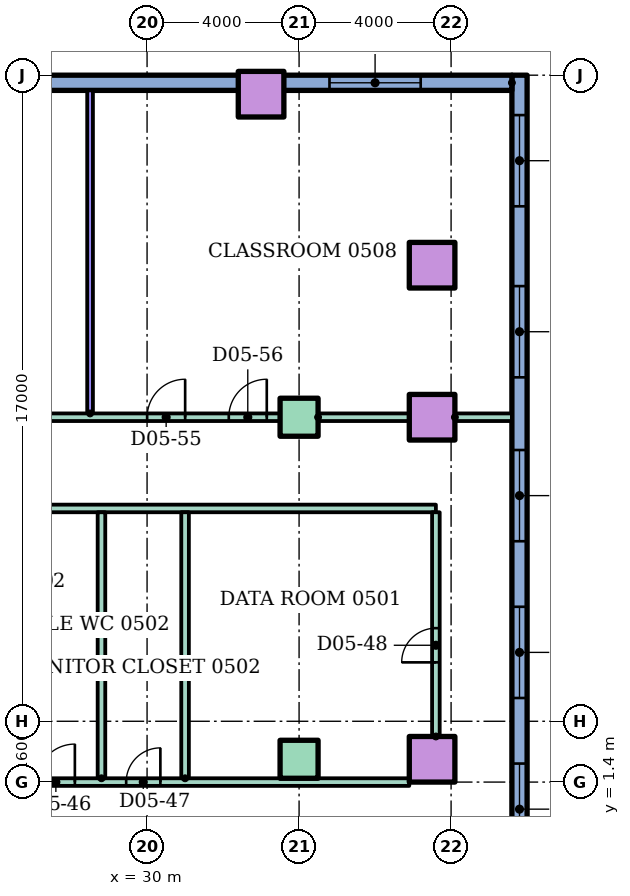
"""IFC4 building model, lengths in metres.
Left out: names, types, materials, properties, quantities, classifications, styles, units other than length and angle.
Written with IfcOpenShell. Run it as: python <this file> out.ifc"""

import sys

from ifc_helpers import new_model, si_unit, direction, frame, frame_2d, origin, origin_2d, place, context, subcontext, project, spatial, rectangle, hollow_rectangle, extrude, element, fill, save


model = new_model("IFC4")
c1 = context("Model", 3, precision=1e-05, world=origin(), true_north=direction((0.0, 1.0)))
c2 = subcontext(c1, "Body", "Model", "MODEL_VIEW")
j1 = project(units=[si_unit("LENGTHUNIT", "METRE"), si_unit("PLANEANGLEUNIT", "RADIAN")], contexts=[c1])
p1 = place(None, origin())
s1 = spatial("IfcSite", under=j1, at=p1, CompositionType="ELEMENT")
p2 = place(p1, origin())
s2 = spatial("IfcBuilding", under=s1, at=p2, CompositionType="ELEMENT")
p3 = place(p2, frame((0.0, 0.0, 22.0)))
s3 = spatial("IfcBuildingStorey", under=s2, at=p3, CompositionType="ELEMENT", Elevation=22.0)
p4 = place(p3, frame((34.0, 2.0, 0.0)))
e1 = element("IfcColumn", 1, at=p4, inside=s3, PredefinedType="COLUMN", context=c2, shape_type="SweptSolid", body=[
    extrude(rectangle(XDim=1.0, YDim=1.0, at=origin_2d()), origin(), (0.0, 0.0, 1.0), 4.0),
])
p5 = place(p3, frame((37.5, 2.0, 0.0)))
e2 = element("IfcColumn", 2, at=p5, inside=s3, PredefinedType="COLUMN", context=c2, shape_type="SweptSolid", body=[
    extrude(hollow_rectangle(XDim=1.2, YDim=1.2, WallThickness=0.06, at=origin_2d()), origin(), (0.0, 0.0, 1.0), 4.0),
])
p6 = place(p3, frame((34.0, 11.0, 0.0)))
e3 = element("IfcColumn", 3, at=p6, inside=s3, PredefinedType="COLUMN", context=c2, shape_type="SweptSolid", body=[
    extrude(rectangle(XDim=1.0, YDim=1.0, at=origin_2d()), origin(), (0.0, 0.0, 1.0), 4.0),
])
for number, where in (
    (4, (37.5, 11.0, 0.0)),
    (5, (37.5, 15.0, 0.0)),
    (6, (33.0, 19.5, 0.0)),
):
    element("IfcColumn", number, at=place(p3, frame(where)), inside=s3, PredefinedType="COLUMN", context=c2, shape_type="SweptSolid", body=[
        extrude(hollow_rectangle(XDim=1.2, YDim=1.2, WallThickness=0.06, at=origin_2d()), origin(), (0.0, 0.0, 1.0), 4.0),
    ])
p7 = place(p3, frame((39.8, -50.0, 0.0), z_axis=(0.0, 0.0, 1.0), x_axis=(0.0, 1.0, 0.0)))
e7 = element("IfcWall", 7, at=p7, inside=s3, PredefinedType="STANDARD", context=c2, shape_type="SweptSolid", body=[
    extrude(rectangle(XDim=70.0, YDim=0.4, at=frame_2d((35.0, 0.0))), origin(), (0.0, 0.0, 1.0), 3.7),
])
p8 = place(p7, frame((0.75, 0.0, 0.9)))
e8 = element("IfcOpeningElement", 8, at=p8, cuts=e7, PredefinedType="OPENING", context=c2, shape_type="SweptSolid", body=[
    extrude(rectangle(XDim=2.4, YDim=2.1, at=frame_2d((1.2, 1.05))), frame((0.0, 0.21, 0.0), z_axis=(0.0, -1.0, 0.0), x_axis=(1.0, 0.0, 0.0)), (0.0, 0.0, 1.0), 0.42),
])
p9 = place(p7, frame((6.633, 0.0, 0.9)))
e9 = element("IfcOpeningElement", 9, at=p9, cuts=e7, PredefinedType="OPENING", context=c2, shape_type="SweptSolid", body=[
    extrude(rectangle(XDim=2.4, YDim=2.1, at=frame_2d((1.2, 1.05))), frame((0.0, 0.21, 0.0), z_axis=(0.0, -1.0, 0.0), x_axis=(1.0, 0.0, 0.0)), (0.0, 0.0, 1.0), 0.42),
])
p10 = place(p7, frame((10.3, 0.0, 0.9)))
e10 = element("IfcOpeningElement", 10, at=p10, cuts=e7, PredefinedType="OPENING", context=c2, shape_type="SweptSolid", body=[
    extrude(rectangle(XDim=2.4, YDim=2.1, at=frame_2d((1.2, 1.05))), frame((0.0, 0.21, 0.0), z_axis=(0.0, -1.0, 0.0), x_axis=(1.0, 0.0, 0.0)), (0.0, 0.0, 1.0), 0.42),
])
p11 = place(p7, frame((13.967, 0.0, 0.9)))
e11 = element("IfcOpeningElement", 11, at=p11, cuts=e7, PredefinedType="OPENING", context=c2, shape_type="SweptSolid", body=[
    extrude(rectangle(XDim=2.4, YDim=2.1, at=frame_2d((1.2, 1.05))), frame((0.0, 0.21, 0.0), z_axis=(0.0, -1.0, 0.0), x_axis=(1.0, 0.0, 0.0)), (0.0, 0.0, 1.0), 0.42),
])
p12 = place(p7, frame((17.633, 0.0, 0.9)))
e12 = element("IfcOpeningElement", 12, at=p12, cuts=e7, PredefinedType="OPENING", context=c2, shape_type="SweptSolid", body=[
    extrude(rectangle(XDim=2.4, YDim=2.1, at=frame_2d((1.2, 1.05))), frame((0.0, 0.21, 0.0), z_axis=(0.0, -1.0, 0.0), x_axis=(1.0, 0.0, 0.0)), (0.0, 0.0, 1.0), 0.42),
])
p13 = place(p7, frame((21.3, 0.0, 0.9)))
e13 = element("IfcOpeningElement", 13, at=p13, cuts=e7, PredefinedType="OPENING", context=c2, shape_type="SweptSolid", body=[
    extrude(rectangle(XDim=2.4, YDim=2.1, at=frame_2d((1.2, 1.05))), frame((0.0, 0.21, 0.0), z_axis=(0.0, -1.0, 0.0), x_axis=(1.0, 0.0, 0.0)), (0.0, 0.0, 1.0), 0.42),
])
p14 = place(p7, frame((24.967, 0.0, 0.9)))
e14 = element("IfcOpeningElement", 14, at=p14, cuts=e7, PredefinedType="OPENING", context=c2, shape_type="SweptSolid", body=[
    extrude(rectangle(XDim=2.4, YDim=2.1, at=frame_2d((1.2, 1.05))), frame((0.0, 0.21, 0.0), z_axis=(0.0, -1.0, 0.0), x_axis=(1.0, 0.0, 0.0)), (0.0, 0.0, 1.0), 0.42),
])
p15 = place(p7, frame((28.863, 0.0, 0.9)))
e15 = element("IfcOpeningElement", 15, at=p15, cuts=e7, PredefinedType="OPENING", context=c2, shape_type="SweptSolid", body=[
    extrude(rectangle(XDim=2.4, YDim=2.1, at=frame_2d((1.2, 1.05))), frame((0.0, 0.21, 0.0), z_axis=(0.0, -1.0, 0.0), x_axis=(1.0, 0.0, 0.0)), (0.0, 0.0, 1.0), 0.42),
])
p16 = place(p7, frame((32.988, 0.0, 0.9)))
e16 = element("IfcOpeningElement", 16, at=p16, cuts=e7, PredefinedType="OPENING", context=c2, shape_type="SweptSolid", body=[
    extrude(rectangle(XDim=2.4, YDim=2.1, at=frame_2d((1.2, 1.05))), frame((0.0, 0.21, 0.0), z_axis=(0.0, -1.0, 0.0), x_axis=(1.0, 0.0, 0.0)), (0.0, 0.0, 1.0), 0.42),
])
p17 = place(p7, frame((37.113, 0.0, 0.9)))
e17 = element("IfcOpeningElement", 17, at=p17, cuts=e7, PredefinedType="OPENING", context=c2, shape_type="SweptSolid", body=[
    extrude(rectangle(XDim=2.4, YDim=2.1, at=frame_2d((1.2, 1.05))), frame((0.0, 0.21, 0.0), z_axis=(0.0, -1.0, 0.0), x_axis=(1.0, 0.0, 0.0)), (0.0, 0.0, 1.0), 0.42),
])
p18 = place(p7, frame((41.238, 0.0, 0.9)))
e18 = element("IfcOpeningElement", 18, at=p18, cuts=e7, PredefinedType="OPENING", context=c2, shape_type="SweptSolid", body=[
    extrude(rectangle(XDim=2.4, YDim=2.1, at=frame_2d((1.2, 1.05))), frame((0.0, 0.21, 0.0), z_axis=(0.0, -1.0, 0.0), x_axis=(1.0, 0.0, 0.0)), (0.0, 0.0, 1.0), 0.42),
])
p19 = place(p7, frame((45.363, 0.0, 0.9)))
e19 = element("IfcOpeningElement", 19, at=p19, cuts=e7, PredefinedType="OPENING", context=c2, shape_type="SweptSolid", body=[
    extrude(rectangle(XDim=2.4, YDim=2.1, at=frame_2d((1.2, 1.05))), frame((0.0, 0.21, 0.0), z_axis=(0.0, -1.0, 0.0), x_axis=(1.0, 0.0, 0.0)), (0.0, 0.0, 1.0), 0.42),
])
p20 = place(p7, frame((49.488, 0.0, 0.9)))
e20 = element("IfcOpeningElement", 20, at=p20, cuts=e7, PredefinedType="OPENING", context=c2, shape_type="SweptSolid", body=[
    extrude(rectangle(XDim=2.4, YDim=2.1, at=frame_2d((1.2, 1.05))), frame((0.0, 0.21, 0.0), z_axis=(0.0, -1.0, 0.0), x_axis=(1.0, 0.0, 0.0)), (0.0, 0.0, 1.0), 0.42),
])
p21 = place(p7, frame((53.613, 0.0, 0.9)))
e21 = element("IfcOpeningElement", 21, at=p21, cuts=e7, PredefinedType="OPENING", context=c2, shape_type="SweptSolid", body=[
    extrude(rectangle(XDim=2.4, YDim=2.1, at=frame_2d((1.2, 1.05))), frame((0.0, 0.21, 0.0), z_axis=(0.0, -1.0, 0.0), x_axis=(1.0, 0.0, 0.0)), (0.0, 0.0, 1.0), 0.42),
])
p22 = place(p7, frame((57.738, 0.0, 0.9)))
e22 = element("IfcOpeningElement", 22, at=p22, cuts=e7, PredefinedType="OPENING", context=c2, shape_type="SweptSolid", body=[
    extrude(rectangle(XDim=2.4, YDim=2.1, at=frame_2d((1.2, 1.05))), frame((0.0, 0.21, 0.0), z_axis=(0.0, -1.0, 0.0), x_axis=(1.0, 0.0, 0.0)), (0.0, 0.0, 1.0), 0.42),
])
p23 = place(p7, frame((62.05, 0.0, 0.9)))
e23 = element("IfcOpeningElement", 23, at=p23, cuts=e7, PredefinedType="OPENING", context=c2, shape_type="SweptSolid", body=[
    extrude(rectangle(XDim=2.4, YDim=2.1, at=frame_2d((1.2, 1.05))), frame((0.0, 0.21, 0.0), z_axis=(0.0, -1.0, 0.0), x_axis=(1.0, 0.0, 0.0)), (0.0, 0.0, 1.0), 0.42),
])
p24 = place(p7, frame((66.55, 0.0, 0.9)))
e24 = element("IfcOpeningElement", 24, at=p24, cuts=e7, PredefinedType="OPENING", context=c2, shape_type="SweptSolid", body=[
    extrude(rectangle(XDim=2.4, YDim=2.1, at=frame_2d((1.2, 1.05))), frame((0.0, 0.21, 0.0), z_axis=(0.0, -1.0, 0.0), x_axis=(1.0, 0.0, 0.0)), (0.0, 0.0, 1.0), 0.42),
])
p25 = place(p3, frame((39.6, 19.8, 0.0), z_axis=(0.0, 0.0, 1.0), x_axis=(-1.0, 0.0, 0.0)))
e25 = element("IfcWall", 25, at=p25, inside=s3, PredefinedType="STANDARD", context=c2, shape_type="SweptSolid", body=[
    extrude(rectangle(XDim=25.6, YDim=0.4, at=frame_2d((12.8, 0.0))), origin(), (0.0, 0.0, 1.0), 3.7),
])
p26 = place(p25, frame((2.4, 0.0, 0.9)))
e26 = element("IfcOpeningElement", 26, at=p26, cuts=e25, PredefinedType="OPENING", context=c2, shape_type="SweptSolid", body=[
    extrude(rectangle(XDim=2.4, YDim=2.1, at=frame_2d((1.2, 1.05))), frame((0.0, 0.21, 0.0), z_axis=(0.0, -1.0, 0.0), x_axis=(1.0, 0.0, 0.0)), (0.0, 0.0, 1.0), 0.42),
])
p27 = place(p25, frame((18.135, 0.0, 0.9)))
e27 = element("IfcOpeningElement", 27, at=p27, cuts=e25, PredefinedType="OPENING", context=c2, shape_type="SweptSolid", body=[
    extrude(rectangle(XDim=2.4, YDim=2.1, at=frame_2d((1.2, 1.05))), frame((0.0, 0.21, 0.0), z_axis=(0.0, -1.0, 0.0), x_axis=(1.0, 0.0, 0.0)), (0.0, 0.0, 1.0), 0.42),
])
p28 = place(p25, frame((22.665, 0.0, 0.9)))
e28 = element("IfcOpeningElement", 28, at=p28, cuts=e25, PredefinedType="OPENING", context=c2, shape_type="SweptSolid", body=[
    extrude(rectangle(XDim=2.4, YDim=2.1, at=frame_2d((1.2, 1.05))), frame((0.0, 0.21, 0.0), z_axis=(0.0, -1.0, 0.0), x_axis=(1.0, 0.0, 0.0)), (0.0, 0.0, 1.0), 0.42),
])
p29 = place(p3, frame((16.3, 1.4, 0.0)))
e29 = element("IfcWall", 29, at=p29, inside=s3, PredefinedType="PARTITIONING", context=c2, shape_type="SweptSolid", body=[
    extrude(rectangle(XDim=20.6, YDim=0.2, at=frame_2d((10.3, 0.0))), origin(), (0.0, 0.0, 1.0), 3.2),
])
p30 = place(p29, frame((2.35, 0.0, 0.0)))
e30 = element("IfcOpeningElement", 30, at=p30, cuts=e29, PredefinedType="OPENING", context=c2, shape_type="SweptSolid", body=[
    extrude(rectangle(XDim=1.0, YDim=2.1, at=frame_2d((0.5, 1.05))), frame((0.0, 0.11, 0.0), z_axis=(0.0, -1.0, 0.0), x_axis=(1.0, 0.0, 0.0)), (0.0, 0.0, 1.0), 0.22),
])
p31 = place(p29, frame((7.1, 0.0, 0.0)))
e31 = element("IfcOpeningElement", 31, at=p31, cuts=e29, PredefinedType="OPENING", context=c2, shape_type="SweptSolid", body=[
    extrude(rectangle(XDim=1.0, YDim=2.1, at=frame_2d((0.5, 1.05))), frame((0.0, 0.11, 0.0), z_axis=(0.0, -1.0, 0.0), x_axis=(1.0, 0.0, 0.0)), (0.0, 0.0, 1.0), 0.22),
])
p32 = place(p29, frame((10.8, 0.0, 0.0)))
e32 = element("IfcOpeningElement", 32, at=p32, cuts=e29, PredefinedType="OPENING", context=c2, shape_type="SweptSolid", body=[
    extrude(rectangle(XDim=1.0, YDim=2.1, at=frame_2d((0.5, 1.05))), frame((0.0, 0.11, 0.0), z_axis=(0.0, -1.0, 0.0), x_axis=(1.0, 0.0, 0.0)), (0.0, 0.0, 1.0), 0.22),
])
p33 = place(p29, frame((13.15, 0.0, 0.0)))
e33 = element("IfcOpeningElement", 33, at=p33, cuts=e29, PredefinedType="OPENING", context=c2, shape_type="SweptSolid", body=[
    extrude(rectangle(XDim=0.9, YDim=2.1, at=frame_2d((0.45, 1.05))), frame((0.0, 0.11, 0.0), z_axis=(0.0, -1.0, 0.0), x_axis=(1.0, 0.0, 0.0)), (0.0, 0.0, 1.0), 0.22),
])
p34 = place(p3, frame((16.3, 8.6, 0.0)))
e34 = element("IfcWall", 34, at=p34, inside=s3, PredefinedType="PARTITIONING", context=c2, shape_type="SweptSolid", body=[
    extrude(rectangle(XDim=21.3, YDim=0.2, at=frame_2d((10.65, 0.0))), origin(), (0.0, 0.0, 1.0), 3.2),
])
p35 = place(p3, frame((26.5, 11.0, 0.0)))
e35 = element("IfcWall", 35, at=p35, inside=s3, PredefinedType="PARTITIONING", context=c2, shape_type="SweptSolid", body=[
    extrude(rectangle(XDim=7.0, YDim=0.2, at=frame_2d((3.5, 0.0))), origin(), (0.0, 0.0, 1.0), 3.2),
])
p36 = place(p35, frame((3.502, 0.0, 0.0)))
e36 = element("IfcOpeningElement", 36, at=p36, cuts=e35, PredefinedType="OPENING", context=c2, shape_type="SweptSolid", body=[
    extrude(rectangle(XDim=1.0, YDim=2.1, at=frame_2d((0.5, 1.05))), frame((0.0, 0.11, 0.0), z_axis=(0.0, -1.0, 0.0), x_axis=(1.0, 0.0, 0.0)), (0.0, 0.0, 1.0), 0.22),
])
p37 = place(p35, frame((5.65, 0.0, 0.0)))
e37 = element("IfcOpeningElement", 37, at=p37, cuts=e35, PredefinedType="OPENING", context=c2, shape_type="SweptSolid", body=[
    extrude(rectangle(XDim=1.0, YDim=2.1, at=frame_2d((0.5, 1.05))), frame((0.0, 0.11, 0.0), z_axis=(0.0, -1.0, 0.0), x_axis=(1.0, 0.0, 0.0)), (0.0, 0.0, 1.0), 0.22),
])
p38 = place(p3, frame((34.5, 11.0, 0.0)))
e38 = element("IfcWall", 38, at=p38, inside=s3, PredefinedType="PARTITIONING", context=c2, shape_type="SweptSolid", body=[
    extrude(rectangle(XDim=2.4, YDim=0.2, at=frame_2d((1.2, 0.0))), origin(), (0.0, 0.0, 1.0), 3.2),
])
p39 = place(p3, frame((38.1, 11.0, 0.0)))
e39 = element("IfcWall", 39, at=p39, inside=s3, PredefinedType="PARTITIONING", context=c2, shape_type="SweptSolid", body=[
    extrude(rectangle(XDim=1.5, YDim=0.2, at=frame_2d((0.75, 0.0))), origin(), (0.0, 0.0, 1.0), 3.2),
])
p40 = place(p3, frame((28.5, 11.1, 0.0), z_axis=(0.0, 0.0, 1.0), x_axis=(0.0, 1.0, 0.0)))
e40 = element("IfcWall", 40, at=p40, inside=s3, PredefinedType="PARTITIONING", context=c2, shape_type="SweptSolid", body=[
    extrude(rectangle(XDim=8.5, YDim=0.15, at=frame_2d((4.25, 0.0))), origin(), (0.0, 0.0, 1.0), 3.2),
])
for number, where, z_axis, x_axis in (
    (41, (28.8, 1.5, 0.0), (0.0, 0.0, 1.0), (0.0, 1.0, 0.0)),
    (42, (31.0, 1.5, 0.0), (0.0, 0.0, 1.0), (0.0, 1.0, 0.0)),
):
    element("IfcWall", number, at=place(p3, frame(where, z_axis=z_axis, x_axis=x_axis)), inside=s3, PredefinedType="PARTITIONING", context=c2, shape_type="SweptSolid", body=[
        extrude(rectangle(XDim=7.0, YDim=0.2, at=frame_2d((3.5, 0.0))), origin(), (0.0, 0.0, 1.0), 3.2),
    ])
p41 = place(p3, frame((37.6, 2.6, 0.0), z_axis=(0.0, 0.0, 1.0), x_axis=(0.0, 1.0, 0.0)))
e43 = element("IfcWall", 43, at=p41, inside=s3, PredefinedType="PARTITIONING", context=c2, shape_type="SweptSolid", body=[
    extrude(rectangle(XDim=5.9, YDim=0.2, at=frame_2d((2.95, 0.0))), origin(), (0.0, 0.0, 1.0), 3.2),
])
p42 = place(p41, frame((1.95, 0.0, 0.0)))
e44 = element("IfcOpeningElement", 44, at=p42, cuts=e43, PredefinedType="OPENING", context=c2, shape_type="SweptSolid", body=[
    extrude(rectangle(XDim=0.9, YDim=2.1, at=frame_2d((0.45, 1.05))), frame((0.0, 0.11, 0.0), z_axis=(0.0, -1.0, 0.0), x_axis=(1.0, 0.0, 0.0)), (0.0, 0.0, 1.0), 0.22),
])
p43 = place(p20, origin())
e45 = element("IfcWindow", 45, at=p43, inside=s3, PartitioningType="SINGLE_PANEL", PredefinedType="WINDOW", context=c2, shape_type="SweptSolid", body=[
    extrude(rectangle(XDim=2.4, YDim=2.1, at=frame_2d((1.2, 1.05))), frame((0.0, 0.03, 0.0), z_axis=(0.0, -1.0, 0.0), x_axis=(1.0, 0.0, 0.0)), (0.0, 0.0, 1.0), 0.06),
])
fill(e20, e45)
p44 = place(p21, origin())
e46 = element("IfcWindow", 46, at=p44, inside=s3, PartitioningType="SINGLE_PANEL", PredefinedType="WINDOW", context=c2, shape_type="SweptSolid", body=[
    extrude(rectangle(XDim=2.4, YDim=2.1, at=frame_2d((1.2, 1.05))), frame((0.0, 0.03, 0.0), z_axis=(0.0, -1.0, 0.0), x_axis=(1.0, 0.0, 0.0)), (0.0, 0.0, 1.0), 0.06),
])
fill(e21, e46)
p45 = place(p22, origin())
e47 = element("IfcWindow", 47, at=p45, inside=s3, PartitioningType="SINGLE_PANEL", PredefinedType="WINDOW", context=c2, shape_type="SweptSolid", body=[
    extrude(rectangle(XDim=2.4, YDim=2.1, at=frame_2d((1.2, 1.05))), frame((0.0, 0.03, 0.0), z_axis=(0.0, -1.0, 0.0), x_axis=(1.0, 0.0, 0.0)), (0.0, 0.0, 1.0), 0.06),
])
fill(e22, e47)
p46 = place(p23, origin())
e48 = element("IfcWindow", 48, at=p46, inside=s3, PartitioningType="SINGLE_PANEL", PredefinedType="WINDOW", context=c2, shape_type="SweptSolid", body=[
    extrude(rectangle(XDim=2.4, YDim=2.1, at=frame_2d((1.2, 1.05))), frame((0.0, 0.03, 0.0), z_axis=(0.0, -1.0, 0.0), x_axis=(1.0, 0.0, 0.0)), (0.0, 0.0, 1.0), 0.06),
])
fill(e23, e48)
p47 = place(p24, origin())
e49 = element("IfcWindow", 49, at=p47, inside=s3, PartitioningType="SINGLE_PANEL", PredefinedType="WINDOW", context=c2, shape_type="SweptSolid", body=[
    extrude(rectangle(XDim=2.4, YDim=2.1, at=frame_2d((1.2, 1.05))), frame((0.0, 0.03, 0.0), z_axis=(0.0, -1.0, 0.0), x_axis=(1.0, 0.0, 0.0)), (0.0, 0.0, 1.0), 0.06),
])
fill(e24, e49)
p48 = place(p26, origin())
e50 = element("IfcWindow", 50, at=p48, inside=s3, PartitioningType="SINGLE_PANEL", PredefinedType="WINDOW", context=c2, shape_type="SweptSolid", body=[
    extrude(rectangle(XDim=2.4, YDim=2.1, at=frame_2d((1.2, 1.05))), frame((0.0, 0.03, 0.0), z_axis=(0.0, -1.0, 0.0), x_axis=(1.0, 0.0, 0.0)), (0.0, 0.0, 1.0), 0.06),
])
fill(e26, e50)
p49 = place(p32, origin())
e51 = element("IfcDoor", 51, at=p49, inside=s3, OperationType="SINGLE_SWING_RIGHT", PredefinedType="DOOR", context=c2, shape_type="SweptSolid", body=[
    extrude(rectangle(XDim=1.0, YDim=2.1, at=frame_2d((0.5, 1.05))), frame((0.0, 0.025, 0.0), z_axis=(0.0, -1.0, 0.0), x_axis=(1.0, 0.0, 0.0)), (0.0, 0.0, 1.0), 0.05),
])
fill(e32, e51)
p50 = place(p33, origin())
e52 = element("IfcDoor", 52, at=p50, inside=s3, OperationType="SINGLE_SWING_RIGHT", PredefinedType="DOOR", context=c2, shape_type="SweptSolid", body=[
    extrude(rectangle(XDim=0.9, YDim=2.1, at=frame_2d((0.45, 1.05))), frame((0.0, 0.025, 0.0), z_axis=(0.0, -1.0, 0.0), x_axis=(1.0, 0.0, 0.0)), (0.0, 0.0, 1.0), 0.05),
])
fill(e33, e52)
p51 = place(p42, origin())
e53 = element("IfcDoor", 53, at=p51, inside=s3, OperationType="SINGLE_SWING_LEFT", PredefinedType="DOOR", context=c2, shape_type="SweptSolid", body=[
    extrude(rectangle(XDim=0.9, YDim=2.1, at=frame_2d((0.45, 1.05))), frame((0.0, 0.025, 0.0), z_axis=(0.0, -1.0, 0.0), x_axis=(1.0, 0.0, 0.0)), (0.0, 0.0, 1.0), 0.05),
])
fill(e44, e53)
p52 = place(p36, origin())
e54 = element("IfcDoor", 54, at=p52, inside=s3, OperationType="SINGLE_SWING_RIGHT", PredefinedType="DOOR", context=c2, shape_type="SweptSolid", body=[
    extrude(rectangle(XDim=1.0, YDim=2.1, at=frame_2d((0.5, 1.05))), frame((0.0, 0.025, 0.0), z_axis=(0.0, -1.0, 0.0), x_axis=(1.0, 0.0, 0.0)), (0.0, 0.0, 1.0), 0.05),
])
fill(e36, e54)
p53 = place(p37, origin())
e55 = element("IfcDoor", 55, at=p53, inside=s3, OperationType="SINGLE_SWING_RIGHT", PredefinedType="DOOR", context=c2, shape_type="SweptSolid", body=[
    extrude(rectangle(XDim=1.0, YDim=2.1, at=frame_2d((0.5, 1.05))), frame((0.0, 0.025, 0.0), z_axis=(0.0, -1.0, 0.0), x_axis=(1.0, 0.0, 0.0)), (0.0, 0.0, 1.0), 0.05),
])
fill(e37, e55)
save(model, sys.argv[1])
